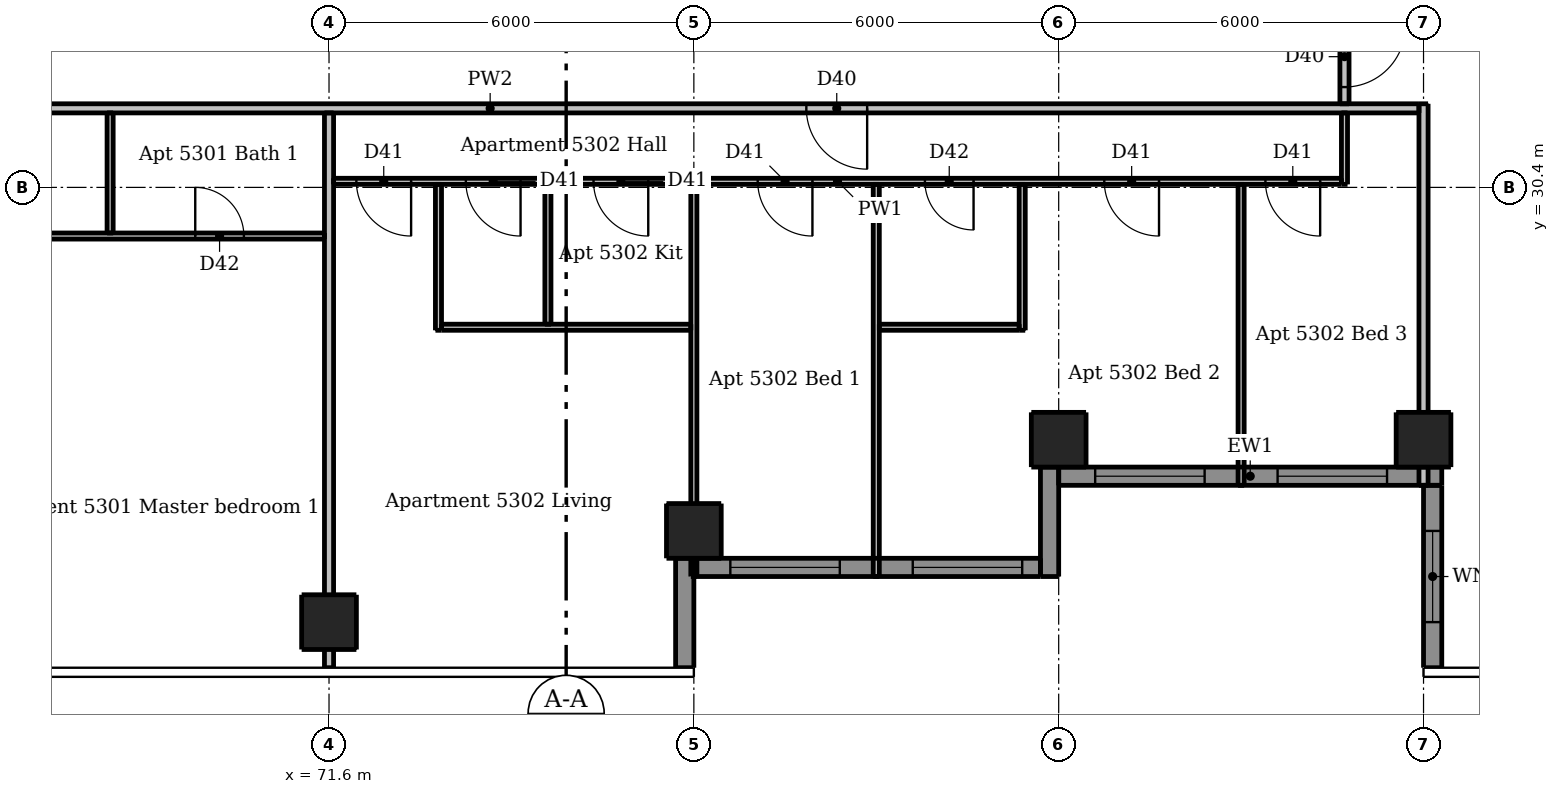
"""IFC4 building model, lengths in metres.
Left out: names, types, materials, properties, quantities, classifications, styles, units other than length and angle.
Written with IfcOpenShell. Run it as: python <this file> out.ifc"""

import sys

from ifc_helpers import new_model, si_unit, direction, frame, frame_2d, origin, origin_2d, place, context, subcontext, project, spatial, rectangle, extrude, element, fill, save


model = new_model("IFC4")
c1 = context("Model", 3, precision=1e-05, world=origin(), true_north=direction((0.0, 1.0)))
c2 = subcontext(c1, "Body", "Model", "MODEL_VIEW")
j1 = project(units=[si_unit("LENGTHUNIT", "METRE"), si_unit("PLANEANGLEUNIT", "RADIAN")], contexts=[c1])
p1 = place(None, origin())
s1 = spatial("IfcSite", under=j1, at=p1, CompositionType="ELEMENT")
p2 = place(p1, origin())
s2 = spatial("IfcBuilding", under=s1, at=p2, CompositionType="ELEMENT")
p3 = place(p2, frame((0.0, 0.0, 200.2)))
s3 = spatial("IfcBuildingStorey", under=s2, at=p3, CompositionType="ELEMENT", Elevation=200.2)
for number, where, z_axis, x_axis in (
    (1, (71.6, 23.25, 0.0), (0.0, 0.0, 1.0), (1.0, 0.0, 0.0)),
    (2, (77.6, 24.75, 0.0), (0.0, 0.0, 1.0), (1.0, 0.0, 0.0)),
    (3, (83.6, 26.25, 0.0), (0.0, 0.0, 1.0), (1.0, 0.0, 0.0)),
    (4, (89.6, 26.25, 0.0), (0.0, 0.0, 1.0), (1.0, 0.0, 0.0)),
):
    element("IfcColumn", number, at=place(p3, frame(where, z_axis=z_axis, x_axis=x_axis)), inside=s3, PredefinedType="COLUMN", context=c2, shape_type="SweptSolid", body=[
        extrude(rectangle(XDim=0.9, YDim=0.9, at=origin_2d()), origin(), (0.0, 0.0, 1.0), 3.05),
    ])
for number, where, z_axis, x_axis in (
    (5, (77.45, 22.5, 0.0), (0.0, 0.0, 1.0), (0.0, 1.0, 0.0)),
    (6, (83.45, 24.0, 0.0), (0.0, 0.0, 1.0), (0.0, 1.0, 0.0)),
):
    element("IfcWall", number, at=place(p3, frame(where, z_axis=z_axis, x_axis=x_axis)), inside=s3, PredefinedType="SOLIDWALL", context=c2, shape_type="SweptSolid", body=[
        extrude(rectangle(XDim=1.8, YDim=0.3, at=frame_2d((0.9, 0.0))), origin(), (0.0, 0.0, 1.0), 3.05),
    ])
p4 = place(p3, frame((89.75, 25.5, 0.0), z_axis=(0.0, 0.0, 1.0), x_axis=(0.0, -1.0, 0.0)))
e7 = element("IfcWall", 7, at=p4, inside=s3, PredefinedType="SOLIDWALL", context=c2, shape_type="SweptSolid", body=[
    extrude(rectangle(XDim=3.0, YDim=0.3, at=frame_2d((1.5, 0.0))), origin(), (0.0, 0.0, 1.0), 3.05),
])
p5 = place(p4, frame((0.75, 0.0, 0.9)))
e8 = element("IfcOpeningElement", 8, at=p5, cuts=e7, PredefinedType="OPENING", context=c2, shape_type="SweptSolid", body=[
    extrude(rectangle(XDim=1.5, YDim=1.5, at=frame_2d((0.75, 0.75))), frame((0.0, 0.16, 0.0), z_axis=(0.0, -1.0, 0.0), x_axis=(1.0, 0.0, 0.0)), (0.0, 0.0, 1.0), 0.32),
])
p6 = place(p3, frame((77.6, 24.15, 0.0), z_axis=(0.0, 0.0, 1.0), x_axis=(1.0, 0.0, 0.0)))
e9 = element("IfcWall", 9, at=p6, inside=s3, PredefinedType="SOLIDWALL", context=c2, shape_type="SweptSolid", body=[
    extrude(rectangle(XDim=5.7, YDim=0.3, at=frame_2d((2.85, 0.0))), origin(), (0.0, 0.0, 1.0), 3.05),
])
p7 = place(p6, frame((0.6, 0.0, 0.15)))
e10 = element("IfcOpeningElement", 10, at=p7, cuts=e9, PredefinedType="OPENING", context=c2, shape_type="SweptSolid", body=[
    extrude(rectangle(XDim=1.8, YDim=2.1, at=frame_2d((0.9, 1.05))), frame((0.0, 0.16, 0.0), z_axis=(0.0, -1.0, 0.0), x_axis=(1.0, 0.0, 0.0)), (0.0, 0.0, 1.0), 0.32),
])
p8 = place(p6, frame((3.6, 0.0, 0.15)))
e11 = element("IfcOpeningElement", 11, at=p8, cuts=e9, PredefinedType="OPENING", context=c2, shape_type="SweptSolid", body=[
    extrude(rectangle(XDim=1.8, YDim=2.1, at=frame_2d((0.9, 1.05))), frame((0.0, 0.16, 0.0), z_axis=(0.0, -1.0, 0.0), x_axis=(1.0, 0.0, 0.0)), (0.0, 0.0, 1.0), 0.32),
])
p9 = place(p3, frame((83.6, 25.65, 0.0), z_axis=(0.0, 0.0, 1.0), x_axis=(1.0, 0.0, 0.0)))
e12 = element("IfcWall", 12, at=p9, inside=s3, PredefinedType="SOLIDWALL", context=c2, shape_type="SweptSolid", body=[
    extrude(rectangle(XDim=6.3, YDim=0.3, at=frame_2d((3.15, 0.0))), origin(), (0.0, 0.0, 1.0), 3.05),
])
p10 = place(p9, frame((0.6, 0.0, 0.15)))
e13 = element("IfcOpeningElement", 13, at=p10, cuts=e12, PredefinedType="OPENING", context=c2, shape_type="SweptSolid", body=[
    extrude(rectangle(XDim=1.8, YDim=2.1, at=frame_2d((0.9, 1.05))), frame((0.0, 0.16, 0.0), z_axis=(0.0, -1.0, 0.0), x_axis=(1.0, 0.0, 0.0)), (0.0, 0.0, 1.0), 0.32),
])
p11 = place(p9, frame((3.6, 0.0, 0.15)))
e14 = element("IfcOpeningElement", 14, at=p11, cuts=e12, PredefinedType="OPENING", context=c2, shape_type="SweptSolid", body=[
    extrude(rectangle(XDim=1.8, YDim=2.1, at=frame_2d((0.9, 1.05))), frame((0.0, 0.16, 0.0), z_axis=(0.0, -1.0, 0.0), x_axis=(1.0, 0.0, 0.0)), (0.0, 0.0, 1.0), 0.32),
])
p12 = place(p3, frame((68.0, 29.65, 0.0), z_axis=(0.0, 0.0, 1.0), x_axis=(0.0, 1.0, 0.0)))
e15 = element("IfcWall", 15, at=p12, inside=s3, PredefinedType="PARTITIONING", context=c2, shape_type="SweptSolid", body=[
    extrude(rectangle(XDim=1.975, YDim=0.1, at=frame_2d((0.988, 0.0))), origin(), (0.0, 0.0, 1.0), 3.05),
])
p13 = place(p3, frame((73.4, 28.05, 0.0), z_axis=(0.0, 0.0, 1.0), x_axis=(0.0, 1.0, 0.0)))
e16 = element("IfcWall", 16, at=p13, inside=s3, PredefinedType="PARTITIONING", context=c2, shape_type="SweptSolid", body=[
    extrude(rectangle(XDim=2.4, YDim=0.1, at=frame_2d((1.2, 0.0))), origin(), (0.0, 0.0, 1.0), 3.05),
])
p14 = place(p3, frame((75.2, 28.15, 0.0), z_axis=(0.0, 0.0, 1.0), x_axis=(0.0, 1.0, 0.0)))
e17 = element("IfcWall", 17, at=p14, inside=s3, PredefinedType="PARTITIONING", context=c2, shape_type="SweptSolid", body=[
    extrude(rectangle(XDim=2.3, YDim=0.1, at=frame_2d((1.15, 0.0))), origin(), (0.0, 0.0, 1.0), 3.05),
])
p15 = place(p3, frame((77.6, 24.0, 0.0), z_axis=(0.0, 0.0, 1.0), x_axis=(0.0, 1.0, 0.0)))
e18 = element("IfcWall", 18, at=p15, inside=s3, PredefinedType="PARTITIONING", context=c2, shape_type="SweptSolid", body=[
    extrude(rectangle(XDim=6.45, YDim=0.1, at=frame_2d((3.225, 0.0))), origin(), (0.0, 0.0, 1.0), 2.59),
])
p16 = place(p3, frame((80.6, 24.0, 0.0), z_axis=(0.0, 0.0, 1.0), x_axis=(0.0, 1.0, 0.0)))
e19 = element("IfcWall", 19, at=p16, inside=s3, PredefinedType="PARTITIONING", context=c2, shape_type="SweptSolid", body=[
    extrude(rectangle(XDim=6.45, YDim=0.1, at=frame_2d((3.225, 0.0))), origin(), (0.0, 0.0, 1.0), 3.05),
])
p17 = place(p3, frame((83.0, 28.05, 0.0), z_axis=(0.0, 0.0, 1.0), x_axis=(0.0, 1.0, 0.0)))
e20 = element("IfcWall", 20, at=p17, inside=s3, PredefinedType="PARTITIONING", context=c2, shape_type="SweptSolid", body=[
    extrude(rectangle(XDim=2.4, YDim=0.1, at=frame_2d((1.2, 0.0))), origin(), (0.0, 0.0, 1.0), 3.05),
])
p18 = place(p3, frame((86.6, 25.5, 0.0), z_axis=(0.0, 0.0, 1.0), x_axis=(0.0, 1.0, 0.0)))
e21 = element("IfcWall", 21, at=p18, inside=s3, PredefinedType="PARTITIONING", context=c2, shape_type="SweptSolid", body=[
    extrude(rectangle(XDim=4.95, YDim=0.1, at=frame_2d((2.475, 0.0))), origin(), (0.0, 0.0, 1.0), 3.05),
])
p19 = place(p3, frame((88.3, 30.45, 0.0), z_axis=(0.0, 0.0, 1.0), x_axis=(0.0, 1.0, 0.0)))
e22 = element("IfcWall", 22, at=p19, inside=s3, PredefinedType="PARTITIONING", context=c2, shape_type="SweptSolid", body=[
    extrude(rectangle(XDim=1.175, YDim=0.1, at=frame_2d((0.587, 0.0))), origin(), (0.0, 0.0, 1.0), 3.05),
])
p20 = place(p3, frame((88.25, 30.5, 0.0), z_axis=(0.0, 0.0, 1.0), x_axis=(-1.0, 0.0, 0.0)))
e23 = element("IfcWall", 23, at=p20, inside=s3, PredefinedType="PARTITIONING", context=c2, shape_type="SweptSolid", body=[
    extrude(rectangle(XDim=16.575, YDim=0.1, at=frame_2d((8.288, 0.0))), origin(), (0.0, 0.0, 1.0), 3.05),
])
p21 = place(p20, frame((15.3, 0.0, 0.0)))
e24 = element("IfcOpeningElement", 24, at=p21, cuts=e23, PredefinedType="OPENING", context=c2, shape_type="SweptSolid", body=[
    extrude(rectangle(XDim=0.9, YDim=2.1, at=frame_2d((0.45, 1.05))), frame((0.0, 0.06, 0.0), z_axis=(0.0, -1.0, 0.0), x_axis=(1.0, 0.0, 0.0)), (0.0, 0.0, 1.0), 0.12),
])
p22 = place(p20, frame((11.4, 0.0, 0.0)))
e25 = element("IfcOpeningElement", 25, at=p22, cuts=e23, PredefinedType="OPENING", context=c2, shape_type="SweptSolid", body=[
    extrude(rectangle(XDim=0.9, YDim=2.1, at=frame_2d((0.45, 1.05))), frame((0.0, 0.06, 0.0), z_axis=(0.0, -1.0, 0.0), x_axis=(1.0, 0.0, 0.0)), (0.0, 0.0, 1.0), 0.12),
])
p23 = place(p20, frame((13.5, 0.0, 0.0)))
e26 = element("IfcOpeningElement", 26, at=p23, cuts=e23, PredefinedType="OPENING", context=c2, shape_type="SweptSolid", body=[
    extrude(rectangle(XDim=0.9, YDim=2.1, at=frame_2d((0.45, 1.05))), frame((0.0, 0.06, 0.0), z_axis=(0.0, -1.0, 0.0), x_axis=(1.0, 0.0, 0.0)), (0.0, 0.0, 1.0), 0.12),
])
p24 = place(p20, frame((8.7, 0.0, 0.0)))
e27 = element("IfcOpeningElement", 27, at=p24, cuts=e23, PredefinedType="OPENING", context=c2, shape_type="SweptSolid", body=[
    extrude(rectangle(XDim=0.9, YDim=2.1, at=frame_2d((0.45, 1.05))), frame((0.0, 0.06, 0.0), z_axis=(0.0, -1.0, 0.0), x_axis=(1.0, 0.0, 0.0)), (0.0, 0.0, 1.0), 0.12),
])
p25 = place(p20, frame((3.0, 0.0, 0.0)))
e28 = element("IfcOpeningElement", 28, at=p25, cuts=e23, PredefinedType="OPENING", context=c2, shape_type="SweptSolid", body=[
    extrude(rectangle(XDim=0.9, YDim=2.1, at=frame_2d((0.45, 1.05))), frame((0.0, 0.06, 0.0), z_axis=(0.0, -1.0, 0.0), x_axis=(1.0, 0.0, 0.0)), (0.0, 0.0, 1.0), 0.12),
])
p26 = place(p20, frame((0.35, 0.0, 0.0)))
e29 = element("IfcOpeningElement", 29, at=p26, cuts=e23, PredefinedType="OPENING", context=c2, shape_type="SweptSolid", body=[
    extrude(rectangle(XDim=0.9, YDim=2.1, at=frame_2d((0.45, 1.05))), frame((0.0, 0.06, 0.0), z_axis=(0.0, -1.0, 0.0), x_axis=(1.0, 0.0, 0.0)), (0.0, 0.0, 1.0), 0.12),
])
p27 = place(p20, frame((6.05, 0.0, 0.0)))
e30 = element("IfcOpeningElement", 30, at=p27, cuts=e23, PredefinedType="OPENING", context=c2, shape_type="SweptSolid", body=[
    extrude(rectangle(XDim=0.8, YDim=2.1, at=frame_2d((0.4, 1.05))), frame((0.0, 0.06, 0.0), z_axis=(0.0, -1.0, 0.0), x_axis=(1.0, 0.0, 0.0)), (0.0, 0.0, 1.0), 0.12),
])
p28 = place(p3, frame((65.65, 29.6, 0.0), z_axis=(0.0, 0.0, 1.0), x_axis=(1.0, 0.0, 0.0)))
e31 = element("IfcWall", 31, at=p28, inside=s3, PredefinedType="PARTITIONING", context=c2, shape_type="SweptSolid", body=[
    extrude(rectangle(XDim=5.875, YDim=0.1, at=frame_2d((2.938, 0.0))), origin(), (0.0, 0.0, 1.0), 3.05),
])
p29 = place(p28, frame((3.75, 0.0, 0.0)))
e32 = element("IfcOpeningElement", 32, at=p29, cuts=e31, PredefinedType="OPENING", context=c2, shape_type="SweptSolid", body=[
    extrude(rectangle(XDim=0.8, YDim=2.1, at=frame_2d((0.4, 1.05))), frame((0.0, 0.06, 0.0), z_axis=(0.0, -1.0, 0.0), x_axis=(1.0, 0.0, 0.0)), (0.0, 0.0, 1.0), 0.12),
])
p30 = place(p3, frame((73.45, 28.1, 0.0), z_axis=(0.0, 0.0, 1.0), x_axis=(1.0, 0.0, 0.0)))
e33 = element("IfcWall", 33, at=p30, inside=s3, PredefinedType="PARTITIONING", context=c2, shape_type="SweptSolid", body=[
    extrude(rectangle(XDim=4.1, YDim=0.1, at=frame_2d((2.05, 0.0))), origin(), (0.0, 0.0, 1.0), 3.05),
])
p31 = place(p3, frame((80.65, 28.1, 0.0), z_axis=(0.0, 0.0, 1.0), x_axis=(1.0, 0.0, 0.0)))
e34 = element("IfcWall", 34, at=p31, inside=s3, PredefinedType="PARTITIONING", context=c2, shape_type="SweptSolid", body=[
    extrude(rectangle(XDim=2.3, YDim=0.1, at=frame_2d((1.15, 0.0))), origin(), (0.0, 0.0, 1.0), 3.05),
])
p32 = place(p3, frame((71.6, 22.5, 0.0), z_axis=(0.0, 0.0, 1.0), x_axis=(0.0, 1.0, 0.0)))
e35 = element("IfcWall", 35, at=p32, inside=s3, PredefinedType="PARTITIONING", context=c2, shape_type="SweptSolid", body=[
    extrude(rectangle(XDim=9.125, YDim=0.15, at=frame_2d((4.562, 0.0))), origin(), (0.0, 0.0, 1.0), 2.516),
])
p33 = place(p3, frame((88.3, 61.175, 0.0), z_axis=(0.0, 0.0, 1.0), x_axis=(0.0, -1.0, 0.0)))
e36 = element("IfcWall", 36, at=p33, inside=s3, PredefinedType="PARTITIONING", context=c2, shape_type="SweptSolid", body=[
    extrude(rectangle(XDim=29.4, YDim=0.15, at=frame_2d((14.7, 0.0))), origin(), (0.0, 0.0, 1.0), 3.05),
])
p34 = place(p33, frame((28.125, 0.0, 0.0)))
e37 = element("IfcOpeningElement", 37, at=p34, cuts=e36, PredefinedType="OPENING", context=c2, shape_type="SweptSolid", body=[
    extrude(rectangle(XDim=1.0, YDim=2.1, at=frame_2d((0.5, 1.05))), frame((0.0, 0.085, 0.0), z_axis=(0.0, -1.0, 0.0), x_axis=(1.0, 0.0, 0.0)), (0.0, 0.0, 1.0), 0.17),
])
p35 = place(p33, frame((10.775, 0.0, 0.0)))
e38 = element("IfcOpeningElement", 38, at=p35, cuts=e36, PredefinedType="OPENING", context=c2, shape_type="SweptSolid", body=[
    extrude(rectangle(XDim=1.0, YDim=2.1, at=frame_2d((0.5, 1.05))), frame((0.0, 0.085, 0.0), z_axis=(0.0, -1.0, 0.0), x_axis=(1.0, 0.0, 0.0)), (0.0, 0.0, 1.0), 0.17),
])
p36 = place(p3, frame((89.6, 25.5, 0.0), z_axis=(0.0, 0.0, 1.0), x_axis=(0.0, 1.0, 0.0)))
e39 = element("IfcWall", 39, at=p36, inside=s3, PredefinedType="PARTITIONING", context=c2, shape_type="SweptSolid", body=[
    extrude(rectangle(XDim=6.275, YDim=0.15, at=frame_2d((3.137, 0.0))), origin(), (0.0, 0.0, 1.0), 2.516),
])
p37 = place(p3, frame((89.525, 31.7, 0.0), z_axis=(0.0, 0.0, 1.0), x_axis=(-1.0, 0.0, 0.0)))
e40 = element("IfcWall", 40, at=p37, inside=s3, PredefinedType="PARTITIONING", context=c2, shape_type="SweptSolid", body=[
    extrude(rectangle(XDim=30.55, YDim=0.15, at=frame_2d((15.275, 0.0))), origin(), (0.0, 0.0, 1.0), 3.05),
])
p38 = place(p37, frame((26.775, 0.0, 0.0)))
e41 = element("IfcOpeningElement", 41, at=p38, cuts=e40, PredefinedType="OPENING", context=c2, shape_type="SweptSolid", body=[
    extrude(rectangle(XDim=1.0, YDim=2.1, at=frame_2d((0.5, 1.05))), frame((0.0, 0.085, 0.0), z_axis=(0.0, -1.0, 0.0), x_axis=(1.0, 0.0, 0.0)), (0.0, 0.0, 1.0), 0.17),
])
p39 = place(p37, frame((9.075, 0.0, 0.0)))
e42 = element("IfcOpeningElement", 42, at=p39, cuts=e40, PredefinedType="OPENING", context=c2, shape_type="SweptSolid", body=[
    extrude(rectangle(XDim=1.0, YDim=2.1, at=frame_2d((0.5, 1.05))), frame((0.0, 0.085, 0.0), z_axis=(0.0, -1.0, 0.0), x_axis=(1.0, 0.0, 0.0)), (0.0, 0.0, 1.0), 0.17),
])
p40 = place(p5, origin())
e43 = element("IfcWindow", 43, at=p40, inside=s3, PartitioningType="DOUBLE_PANEL_VERTICAL", PredefinedType="WINDOW", context=c2, shape_type="SweptSolid", body=[
    extrude(rectangle(XDim=1.5, YDim=1.5, at=frame_2d((0.75, 0.75))), frame((0.0, 0.03, 0.0), z_axis=(0.0, -1.0, 0.0), x_axis=(1.0, 0.0, 0.0)), (0.0, 0.0, 1.0), 0.06),
])
fill(e8, e43)
p41 = place(p7, origin())
e44 = element("IfcWindow", 44, at=p41, inside=s3, PartitioningType="DOUBLE_PANEL_VERTICAL", PredefinedType="WINDOW", context=c2, shape_type="SweptSolid", body=[
    extrude(rectangle(XDim=1.8, YDim=2.1, at=frame_2d((0.9, 1.05))), frame((0.0, 0.03, 0.0), z_axis=(0.0, -1.0, 0.0), x_axis=(1.0, 0.0, 0.0)), (0.0, 0.0, 1.0), 0.06),
])
fill(e10, e44)
p42 = place(p8, origin())
e45 = element("IfcWindow", 45, at=p42, inside=s3, PartitioningType="DOUBLE_PANEL_VERTICAL", PredefinedType="WINDOW", context=c2, shape_type="SweptSolid", body=[
    extrude(rectangle(XDim=1.8, YDim=2.1, at=frame_2d((0.9, 1.05))), frame((0.0, 0.03, 0.0), z_axis=(0.0, -1.0, 0.0), x_axis=(1.0, 0.0, 0.0)), (0.0, 0.0, 1.0), 0.06),
])
fill(e11, e45)
p43 = place(p10, origin())
e46 = element("IfcWindow", 46, at=p43, inside=s3, PartitioningType="DOUBLE_PANEL_VERTICAL", PredefinedType="WINDOW", context=c2, shape_type="SweptSolid", body=[
    extrude(rectangle(XDim=1.8, YDim=2.1, at=frame_2d((0.9, 1.05))), frame((0.0, 0.03, 0.0), z_axis=(0.0, -1.0, 0.0), x_axis=(1.0, 0.0, 0.0)), (0.0, 0.0, 1.0), 0.06),
])
fill(e13, e46)
p44 = place(p11, origin())
e47 = element("IfcWindow", 47, at=p44, inside=s3, PartitioningType="DOUBLE_PANEL_VERTICAL", PredefinedType="WINDOW", context=c2, shape_type="SweptSolid", body=[
    extrude(rectangle(XDim=1.8, YDim=2.1, at=frame_2d((0.9, 1.05))), frame((0.0, 0.03, 0.0), z_axis=(0.0, -1.0, 0.0), x_axis=(1.0, 0.0, 0.0)), (0.0, 0.0, 1.0), 0.06),
])
fill(e14, e47)
p45 = place(p29, origin())
e48 = element("IfcDoor", 48, at=p45, inside=s3, OperationType="SINGLE_SWING_LEFT", PredefinedType="DOOR", context=c2, shape_type="SweptSolid", body=[
    extrude(rectangle(XDim=0.8, YDim=2.1, at=frame_2d((0.4, 1.05))), frame((0.0, 0.025, 0.0), z_axis=(0.0, -1.0, 0.0), x_axis=(1.0, 0.0, 0.0)), (0.0, 0.0, 1.0), 0.05),
])
fill(e32, e48)
p46 = place(p39, origin())
e49 = element("IfcDoor", 49, at=p46, inside=s3, OperationType="SINGLE_SWING_LEFT", PredefinedType="DOOR", context=c2, shape_type="SweptSolid", body=[
    extrude(rectangle(XDim=1.0, YDim=2.1, at=frame_2d((0.5, 1.05))), frame((0.0, 0.025, 0.0), z_axis=(0.0, -1.0, 0.0), x_axis=(1.0, 0.0, 0.0)), (0.0, 0.0, 1.0), 0.05),
])
fill(e42, e49)
p47 = place(p21, origin())
e50 = element("IfcDoor", 50, at=p47, inside=s3, OperationType="SINGLE_SWING_LEFT", PredefinedType="DOOR", context=c2, shape_type="SweptSolid", body=[
    extrude(rectangle(XDim=0.9, YDim=2.1, at=frame_2d((0.45, 1.05))), frame((0.0, 0.025, 0.0), z_axis=(0.0, -1.0, 0.0), x_axis=(1.0, 0.0, 0.0)), (0.0, 0.0, 1.0), 0.05),
])
fill(e24, e50)
p48 = place(p22, origin())
e51 = element("IfcDoor", 51, at=p48, inside=s3, OperationType="SINGLE_SWING_LEFT", PredefinedType="DOOR", context=c2, shape_type="SweptSolid", body=[
    extrude(rectangle(XDim=0.9, YDim=2.1, at=frame_2d((0.45, 1.05))), frame((0.0, 0.025, 0.0), z_axis=(0.0, -1.0, 0.0), x_axis=(1.0, 0.0, 0.0)), (0.0, 0.0, 1.0), 0.05),
])
fill(e25, e51)
p49 = place(p23, origin())
e52 = element("IfcDoor", 52, at=p49, inside=s3, OperationType="SINGLE_SWING_LEFT", PredefinedType="DOOR", context=c2, shape_type="SweptSolid", body=[
    extrude(rectangle(XDim=0.9, YDim=2.1, at=frame_2d((0.45, 1.05))), frame((0.0, 0.025, 0.0), z_axis=(0.0, -1.0, 0.0), x_axis=(1.0, 0.0, 0.0)), (0.0, 0.0, 1.0), 0.05),
])
fill(e26, e52)
p50 = place(p24, origin())
e53 = element("IfcDoor", 53, at=p50, inside=s3, OperationType="SINGLE_SWING_LEFT", PredefinedType="DOOR", context=c2, shape_type="SweptSolid", body=[
    extrude(rectangle(XDim=0.9, YDim=2.1, at=frame_2d((0.45, 1.05))), frame((0.0, 0.025, 0.0), z_axis=(0.0, -1.0, 0.0), x_axis=(1.0, 0.0, 0.0)), (0.0, 0.0, 1.0), 0.05),
])
fill(e27, e53)
p51 = place(p25, origin())
e54 = element("IfcDoor", 54, at=p51, inside=s3, OperationType="SINGLE_SWING_LEFT", PredefinedType="DOOR", context=c2, shape_type="SweptSolid", body=[
    extrude(rectangle(XDim=0.9, YDim=2.1, at=frame_2d((0.45, 1.05))), frame((0.0, 0.025, 0.0), z_axis=(0.0, -1.0, 0.0), x_axis=(1.0, 0.0, 0.0)), (0.0, 0.0, 1.0), 0.05),
])
fill(e28, e54)
p52 = place(p26, origin())
e55 = element("IfcDoor", 55, at=p52, inside=s3, OperationType="SINGLE_SWING_LEFT", PredefinedType="DOOR", context=c2, shape_type="SweptSolid", body=[
    extrude(rectangle(XDim=0.9, YDim=2.1, at=frame_2d((0.45, 1.05))), frame((0.0, 0.025, 0.0), z_axis=(0.0, -1.0, 0.0), x_axis=(1.0, 0.0, 0.0)), (0.0, 0.0, 1.0), 0.05),
])
fill(e29, e55)
p53 = place(p27, origin())
e56 = element("IfcDoor", 56, at=p53, inside=s3, OperationType="SINGLE_SWING_LEFT", PredefinedType="DOOR", context=c2, shape_type="SweptSolid", body=[
    extrude(rectangle(XDim=0.8, YDim=2.1, at=frame_2d((0.4, 1.05))), frame((0.0, 0.025, 0.0), z_axis=(0.0, -1.0, 0.0), x_axis=(1.0, 0.0, 0.0)), (0.0, 0.0, 1.0), 0.05),
])
fill(e30, e56)
p54 = place(p34, origin())
e57 = element("IfcDoor", 57, at=p54, inside=s3, OperationType="SINGLE_SWING_LEFT", PredefinedType="DOOR", context=c2, shape_type="SweptSolid", body=[
    extrude(rectangle(XDim=1.0, YDim=2.1, at=frame_2d((0.5, 1.05))), frame((0.0, 0.025, 0.0), z_axis=(0.0, -1.0, 0.0), x_axis=(1.0, 0.0, 0.0)), (0.0, 0.0, 1.0), 0.05),
])
fill(e37, e57)
save(model, sys.argv[1])
